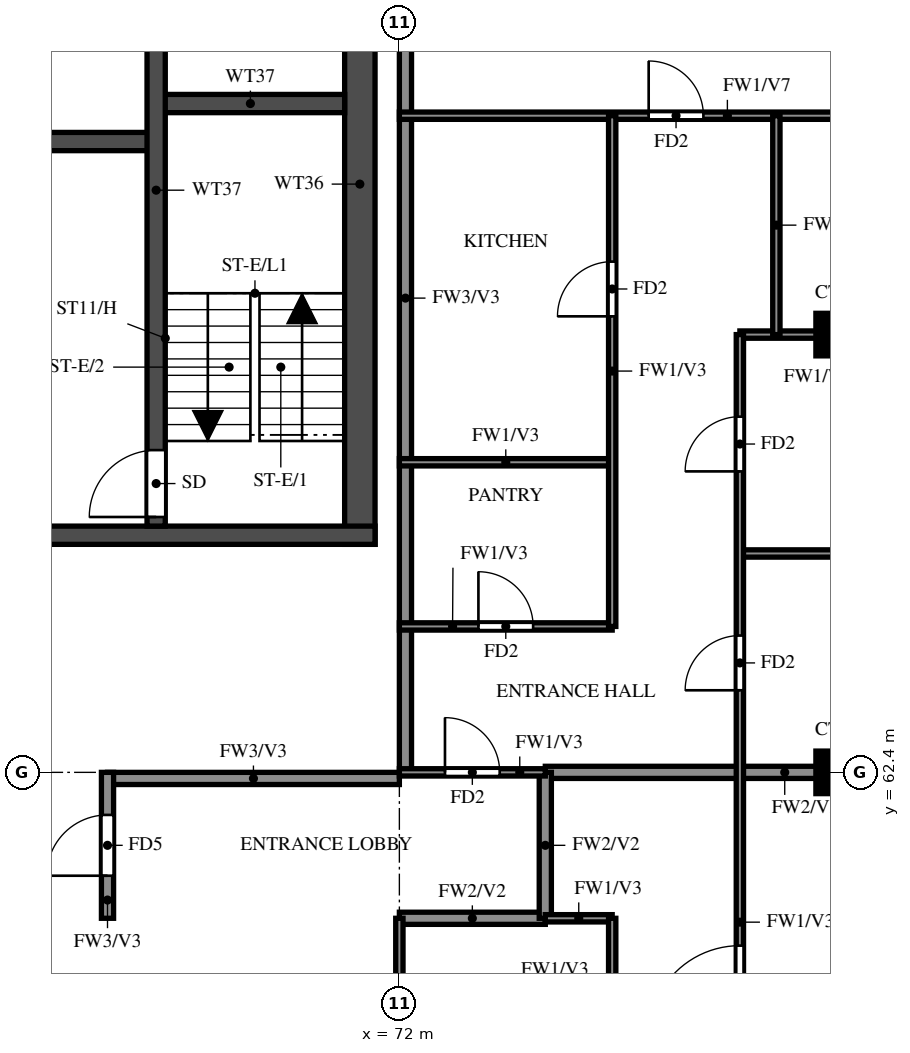
"""IFC4 building model, lengths in metres.
Left out: names, types, materials, properties, quantities, classifications, styles, units other than length and angle.
Written with IfcOpenShell. Run it as: python <this file> out.ifc"""

import sys

from ifc_helpers import new_model, si_unit, direction, frame, frame_2d, origin, origin_2d, place, context, subcontext, project, spatial, rectangle, extrude, source, transform, mapped, element, fill, save


model = new_model("IFC4")
c1 = context("Model", 3, precision=1e-05, world=origin(), true_north=direction((0.0, 1.0)))
c2 = subcontext(c1, "Body", "Model", "MODEL_VIEW")
j1 = project(units=[si_unit("LENGTHUNIT", "METRE"), si_unit("PLANEANGLEUNIT", "RADIAN")], contexts=[c1])
p1 = place(None, origin())
s1 = spatial("IfcSite", under=j1, at=p1, CompositionType="ELEMENT")
p2 = place(p1, origin())
s2 = spatial("IfcBuilding", under=s1, at=p2, CompositionType="ELEMENT")
p3 = place(p2, frame((0.0, 0.0, 257.0)))
s3 = spatial("IfcBuildingStorey", under=s2, at=p3, CompositionType="ELEMENT", Elevation=257.0)
m1 = source(origin(), c2, "Body", "SweptSolid", [
    extrude(rectangle(XDim=0.7, YDim=0.7, at=origin_2d()), origin(), (0.0, 0.0, 1.0), 3.22),
])
for number, where, z_axis, x_axis in (
    (1, (79.2, 62.4, 0.0), (0.0, 0.0, 1.0), (1.0, 0.0, 0.0)),
    (2, (79.2, 69.6, 0.0), (0.0, 0.0, 1.0), (1.0, 0.0, 0.0)),
):
    element("IfcColumn", number, at=place(p3, frame(where, z_axis=z_axis, x_axis=x_axis)), inside=s3, PredefinedType="COLUMN", context=c2, shape_type="MappedRepresentation", body=[
        mapped(m1, transform((0.0, 0.0, 0.0))),
    ])
p4 = place(p3, frame((71.35, 66.15, 0.0), z_axis=(0.0, 0.0, 1.0), x_axis=(0.0, 1.0, 0.0)))
e3 = element("IfcWall", 3, at=p4, inside=s3, PredefinedType="SHEAR", context=c2, shape_type="SweptSolid", body=[
    extrude(rectangle(XDim=11.85, YDim=0.5, at=frame_2d((5.925, 0.0))), origin(), (0.0, 0.0, 1.0), 3.22),
])
p5 = place(p3, frame((29.2, 66.3, 0.0), z_axis=(0.0, 0.0, 1.0), x_axis=(1.0, 0.0, 0.0)))
e4 = element("IfcWall", 4, at=p5, inside=s3, PredefinedType="SHEAR", context=c2, shape_type="SweptSolid", body=[
    extrude(rectangle(XDim=42.4, YDim=0.3, at=frame_2d((21.2, 0.0))), origin(), (0.0, 0.0, 1.0), 3.22),
])
p6 = place(p5, frame((1.425, 0.0, 0.0)))
e5 = element("IfcOpeningElement", 5, at=p6, cuts=e4, PredefinedType="OPENING", context=c2, shape_type="SweptSolid", body=[
    extrude(rectangle(XDim=1.1, YDim=2.1, at=frame_2d((0.55, 1.05))), frame((0.0, 0.16, 0.0), z_axis=(0.0, -1.0, 0.0), x_axis=(1.0, 0.0, 0.0)), (0.0, 0.0, 1.0), 0.32),
])
p7 = place(p5, frame((4.2, 0.0, 0.0)))
e6 = element("IfcOpeningElement", 6, at=p7, cuts=e4, PredefinedType="OPENING", context=c2, shape_type="SweptSolid", body=[
    extrude(rectangle(XDim=1.8, YDim=2.1, at=frame_2d((0.9, 1.05))), frame((0.0, 0.16, 0.0), z_axis=(0.0, -1.0, 0.0), x_axis=(1.0, 0.0, 0.0)), (0.0, 0.0, 1.0), 0.32),
])
p8 = place(p3, frame((32.8, 72.775, 0.0), z_axis=(0.0, 0.0, 1.0), x_axis=(1.0, 0.0, 0.0)))
e7 = element("IfcWall", 7, at=p8, inside=s3, PredefinedType="SHEAR", context=c2, shape_type="SweptSolid", body=[
    extrude(rectangle(XDim=35.2, YDim=0.3, at=frame_2d((17.6, 0.0))), origin(), (0.0, 0.0, 1.0), 3.22),
])
p9 = place(p8, frame((19.8, 0.0, 0.0)))
e8 = element("IfcOpeningElement", 8, at=p9, cuts=e7, PredefinedType="OPENING", context=c2, shape_type="SweptSolid", body=[
    extrude(rectangle(XDim=1.1, YDim=2.1, at=frame_2d((0.55, 1.05))), frame((0.0, 0.16, 0.0), z_axis=(0.0, -1.0, 0.0), x_axis=(1.0, 0.0, 0.0)), (0.0, 0.0, 1.0), 0.32),
])
p10 = place(p8, frame((27.725, 0.0, 0.0)))
e9 = element("IfcOpeningElement", 9, at=p10, cuts=e7, PredefinedType="OPENING", context=c2, shape_type="SweptSolid", body=[
    extrude(rectangle(XDim=1.1, YDim=2.1, at=frame_2d((0.55, 1.05))), frame((0.0, 0.16, 0.0), z_axis=(0.0, -1.0, 0.0), x_axis=(1.0, 0.0, 0.0)), (0.0, 0.0, 1.0), 0.32),
])
p11 = place(p8, frame((30.325, 0.0, 0.0)))
e10 = element("IfcOpeningElement", 10, at=p11, cuts=e7, PredefinedType="OPENING", context=c2, shape_type="SweptSolid", body=[
    extrude(rectangle(XDim=1.1, YDim=2.1, at=frame_2d((0.55, 1.05))), frame((0.0, 0.16, 0.0), z_axis=(0.0, -1.0, 0.0), x_axis=(1.0, 0.0, 0.0)), (0.0, 0.0, 1.0), 0.32),
])
p12 = place(p8, frame((3.825, 0.0, 0.0)))
e11 = element("IfcOpeningElement", 11, at=p12, cuts=e7, PredefinedType="OPENING", context=c2, shape_type="SweptSolid", body=[
    extrude(rectangle(XDim=1.1, YDim=2.1, at=frame_2d((0.55, 1.05))), frame((0.0, 0.16, 0.0), z_axis=(0.0, -1.0, 0.0), x_axis=(1.0, 0.0, 0.0)), (0.0, 0.0, 1.0), 0.32),
])
p13 = place(p8, frame((6.575, 0.0, 0.0)))
e12 = element("IfcOpeningElement", 12, at=p13, cuts=e7, PredefinedType="OPENING", context=c2, shape_type="SweptSolid", body=[
    extrude(rectangle(XDim=1.1, YDim=2.1, at=frame_2d((0.55, 1.05))), frame((0.0, 0.16, 0.0), z_axis=(0.0, -1.0, 0.0), x_axis=(1.0, 0.0, 0.0)), (0.0, 0.0, 1.0), 0.32),
])
p14 = place(p8, frame((9.325, 0.0, 0.0)))
e13 = element("IfcOpeningElement", 13, at=p14, cuts=e7, PredefinedType="OPENING", context=c2, shape_type="SweptSolid", body=[
    extrude(rectangle(XDim=1.1, YDim=2.1, at=frame_2d((0.55, 1.05))), frame((0.0, 0.16, 0.0), z_axis=(0.0, -1.0, 0.0), x_axis=(1.0, 0.0, 0.0)), (0.0, 0.0, 1.0), 0.32),
])
p15 = place(p8, frame((12.075, 0.0, 0.0)))
e14 = element("IfcOpeningElement", 14, at=p15, cuts=e7, PredefinedType="OPENING", context=c2, shape_type="SweptSolid", body=[
    extrude(rectangle(XDim=1.1, YDim=2.1, at=frame_2d((0.55, 1.05))), frame((0.0, 0.16, 0.0), z_axis=(0.0, -1.0, 0.0), x_axis=(1.0, 0.0, 0.0)), (0.0, 0.0, 1.0), 0.32),
])
p16 = place(p8, frame((14.825, 0.0, 0.0)))
e15 = element("IfcOpeningElement", 15, at=p16, cuts=e7, PredefinedType="OPENING", context=c2, shape_type="SweptSolid", body=[
    extrude(rectangle(XDim=1.1, YDim=2.1, at=frame_2d((0.55, 1.05))), frame((0.0, 0.16, 0.0), z_axis=(0.0, -1.0, 0.0), x_axis=(1.0, 0.0, 0.0)), (0.0, 0.0, 1.0), 0.32),
])
p17 = place(p8, frame((17.575, 0.0, 0.0)))
e16 = element("IfcOpeningElement", 16, at=p17, cuts=e7, PredefinedType="OPENING", context=c2, shape_type="SweptSolid", body=[
    extrude(rectangle(XDim=1.1, YDim=2.1, at=frame_2d((0.55, 1.05))), frame((0.0, 0.16, 0.0), z_axis=(0.0, -1.0, 0.0), x_axis=(1.0, 0.0, 0.0)), (0.0, 0.0, 1.0), 0.32),
])
p18 = place(p8, frame((0.95, 0.0, 0.0)))
e17 = element("IfcOpeningElement", 17, at=p18, cuts=e7, PredefinedType="OPENING", context=c2, shape_type="SweptSolid", body=[
    extrude(rectangle(XDim=1.1, YDim=2.1, at=frame_2d((0.55, 1.05))), frame((0.0, 0.16, 0.0), z_axis=(0.0, -1.0, 0.0), x_axis=(1.0, 0.0, 0.0)), (0.0, 0.0, 1.0), 0.32),
])
p19 = place(p3, frame((68.0, 73.4, 0.0), z_axis=(0.0, 0.0, 1.0), x_axis=(1.0, 0.0, 0.0)))
e18 = element("IfcWall", 18, at=p19, inside=s3, PredefinedType="SHEAR", context=c2, shape_type="SweptSolid", body=[
    extrude(rectangle(XDim=3.1, YDim=0.3, at=frame_2d((1.55, 0.0))), origin(), (0.0, 0.0, 1.0), 3.22),
])
p20 = place(p3, frame((68.0, 66.45, 0.0), z_axis=(0.0, 0.0, 1.0), x_axis=(0.0, 1.0, 0.0)))
e19 = element("IfcWall", 19, at=p20, inside=s3, PredefinedType="SHEAR", context=c2, shape_type="SweptSolid", body=[
    extrude(rectangle(XDim=11.05, YDim=0.3, at=frame_2d((5.525, 0.0))), origin(), (0.0, 0.0, 1.0), 3.22),
])
p21 = place(p20, frame((0.15, 0.0, 0.0)))
e20 = element("IfcOpeningElement", 20, at=p21, cuts=e19, PredefinedType="OPENING", context=c2, shape_type="SweptSolid", body=[
    extrude(rectangle(XDim=1.1, YDim=2.1, at=frame_2d((0.55, 1.05))), frame((0.0, 0.16, 0.0), z_axis=(0.0, -1.0, 0.0), x_axis=(1.0, 0.0, 0.0)), (0.0, 0.0, 1.0), 0.32),
])
p22 = place(p3, frame((67.2, 62.3, 0.0), z_axis=(0.0, 0.0, 1.0), x_axis=(1.0, 0.0, 0.0)))
e21 = element("IfcWall", 21, at=p22, inside=s3, PredefinedType="SOLIDWALL", context=c2, shape_type="SweptSolid", body=[
    extrude(rectangle(XDim=4.8, YDim=0.2, at=frame_2d((2.4, 0.0))), origin(), (0.0, 0.0, 1.0), 3.22),
])
p23 = place(p3, frame((67.2, 60.0, 0.0), z_axis=(0.0, 0.0, 1.0), x_axis=(0.0, 1.0, 0.0)))
e22 = element("IfcWall", 22, at=p23, inside=s3, PredefinedType="SOLIDWALL", context=c2, shape_type="SweptSolid", body=[
    extrude(rectangle(XDim=2.4, YDim=0.2, at=frame_2d((1.2, 0.0))), origin(), (0.0, 0.0, 1.0), 3.22),
])
p24 = place(p23, frame((0.7, 0.0, 0.0)))
e23 = element("IfcOpeningElement", 23, at=p24, cuts=e22, PredefinedType="OPENING", context=c2, shape_type="SweptSolid", body=[
    extrude(rectangle(XDim=1.0, YDim=2.1, at=frame_2d((0.5, 1.05))), frame((0.0, 0.11, 0.0), z_axis=(0.0, -1.0, 0.0), x_axis=(1.0, 0.0, 0.0)), (0.0, 0.0, 1.0), 0.22),
])
p25 = place(p3, frame((72.1, 62.4, 0.0), z_axis=(0.0, 0.0, 1.0), x_axis=(0.0, 1.0, 0.0)))
e24 = element("IfcWall", 24, at=p25, inside=s3, PredefinedType="SOLIDWALL", context=c2, shape_type="SweptSolid", body=[
    extrude(rectangle(XDim=15.6, YDim=0.2, at=frame_2d((7.8, 0.0))), origin(), (0.0, 0.0, 1.0), 3.22),
])
p26 = place(p3, frame((72.0, 60.0, 0.0), z_axis=(0.0, 0.0, 1.0), x_axis=(1.0, 0.0, 0.0)))
e25 = element("IfcWall", 25, at=p26, inside=s3, PredefinedType="SOLIDWALL", context=c2, shape_type="SweptSolid", body=[
    extrude(rectangle(XDim=2.4, YDim=0.2, at=frame_2d((1.2, 0.0))), origin(), (0.0, 0.0, 1.0), 3.22),
])
p27 = place(p3, frame((74.4, 62.4, 0.0), z_axis=(0.0, 0.0, 1.0), x_axis=(1.0, 0.0, 0.0)))
e26 = element("IfcWall", 26, at=p27, inside=s3, PredefinedType="SOLIDWALL", context=c2, shape_type="SweptSolid", body=[
    extrude(rectangle(XDim=7.875, YDim=0.2, at=frame_2d((3.938, 0.0))), origin(), (0.0, 0.0, 1.0), 3.22),
])
p28 = place(p3, frame((74.4, 60.0, 0.0), z_axis=(0.0, 0.0, 1.0), x_axis=(0.0, 1.0, 0.0)))
e27 = element("IfcWall", 27, at=p28, inside=s3, PredefinedType="SOLIDWALL", context=c2, shape_type="SweptSolid", body=[
    extrude(rectangle(XDim=2.4, YDim=0.2, at=frame_2d((1.2, 0.0))), origin(), (0.0, 0.0, 1.0), 3.22),
])
p29 = place(p3, frame((74.4, 60.0, 0.0), z_axis=(0.0, 0.0, 1.0), x_axis=(1.0, 0.0, 0.0)))
e28 = element("IfcWall", 28, at=p29, inside=s3, PredefinedType="PARTITIONING", context=c2, shape_type="SweptSolid", body=[
    extrude(rectangle(XDim=1.1, YDim=0.12, at=frame_2d((0.55, 0.0))), origin(), (0.0, 0.0, 1.0), 3.22),
])
p30 = place(p3, frame((72.0, 62.4, 0.0), z_axis=(0.0, 0.0, 1.0), x_axis=(1.0, 0.0, 0.0)))
e29 = element("IfcWall", 29, at=p30, inside=s3, PredefinedType="PARTITIONING", context=c2, shape_type="SweptSolid", body=[
    extrude(rectangle(XDim=2.4, YDim=0.12, at=frame_2d((1.2, 0.0))), origin(), (0.0, 0.0, 1.0), 3.22),
])
p31 = place(p30, frame((0.75, 0.0, 0.0)))
e30 = element("IfcOpeningElement", 30, at=p31, cuts=e29, PredefinedType="OPENING", context=c2, shape_type="SweptSolid", body=[
    extrude(rectangle(XDim=0.9, YDim=2.1, at=frame_2d((0.45, 1.05))), frame((0.0, 0.07, 0.0), z_axis=(0.0, -1.0, 0.0), x_axis=(1.0, 0.0, 0.0)), (0.0, 0.0, 1.0), 0.14),
])
p32 = place(p3, frame((72.0, 64.8, 0.0), z_axis=(0.0, 0.0, 1.0), x_axis=(1.0, 0.0, 0.0)))
e31 = element("IfcWall", 31, at=p32, inside=s3, PredefinedType="PARTITIONING", context=c2, shape_type="SweptSolid", body=[
    extrude(rectangle(XDim=3.5, YDim=0.12, at=frame_2d((1.75, 0.0))), origin(), (0.0, 0.0, 1.0), 3.22),
])
p33 = place(p32, frame((1.3, 0.0, 0.0)))
e32 = element("IfcOpeningElement", 32, at=p33, cuts=e31, PredefinedType="OPENING", context=c2, shape_type="SweptSolid", body=[
    extrude(rectangle(XDim=0.9, YDim=2.1, at=frame_2d((0.45, 1.05))), frame((0.0, 0.07, 0.0), z_axis=(0.0, -1.0, 0.0), x_axis=(1.0, 0.0, 0.0)), (0.0, 0.0, 1.0), 0.14),
])
p34 = place(p3, frame((77.6, 66.0, 0.0), z_axis=(0.0, 0.0, 1.0), x_axis=(1.0, 0.0, 0.0)))
e33 = element("IfcWall", 33, at=p34, inside=s3, PredefinedType="PARTITIONING", context=c2, shape_type="SweptSolid", body=[
    extrude(rectangle(XDim=4.675, YDim=0.12, at=frame_2d((2.337, 0.0))), origin(), (0.0, 0.0, 1.0), 2.32),
])
p35 = place(p3, frame((72.0, 67.5, 0.0), z_axis=(0.0, 0.0, 1.0), x_axis=(1.0, 0.0, 0.0)))
e34 = element("IfcWall", 34, at=p35, inside=s3, PredefinedType="PARTITIONING", context=c2, shape_type="SweptSolid", body=[
    extrude(rectangle(XDim=3.5, YDim=0.12, at=frame_2d((1.75, 0.0))), origin(), (0.0, 0.0, 1.0), 3.22),
])
p36 = place(p3, frame((77.6, 69.6, 0.0), z_axis=(0.0, 0.0, 1.0), x_axis=(1.0, 0.0, 0.0)))
e35 = element("IfcWall", 35, at=p36, inside=s3, PredefinedType="PARTITIONING", context=c2, shape_type="SweptSolid", body=[
    extrude(rectangle(XDim=4.675, YDim=0.12, at=frame_2d((2.337, 0.0))), origin(), (0.0, 0.0, 1.0), 3.22),
])
p37 = place(p36, frame((2.337, 0.0, 0.0)))
e36 = element("IfcOpeningElement", 36, at=p37, cuts=e35, PredefinedType="OPENING", context=c2, shape_type="SweptSolid", body=[
    extrude(rectangle(XDim=0.8, YDim=2.1, at=frame_2d((0.4, 1.05))), frame((0.0, 0.07, 0.0), z_axis=(0.0, -1.0, 0.0), x_axis=(1.0, 0.0, 0.0)), (0.0, 0.0, 1.0), 0.14),
])
p38 = place(p3, frame((72.0, 73.2, 0.0), z_axis=(0.0, 0.0, 1.0), x_axis=(1.0, 0.0, 0.0)))
e37 = element("IfcWall", 37, at=p38, inside=s3, PredefinedType="PARTITIONING", context=c2, shape_type="SweptSolid", body=[
    extrude(rectangle(XDim=10.275, YDim=0.12, at=frame_2d((5.137, 0.0))), origin(), (0.0, 0.0, 1.0), 2.32),
])
p39 = place(p38, frame((4.1, 0.0, 0.0)))
e38 = element("IfcOpeningElement", 38, at=p39, cuts=e37, PredefinedType="OPENING", context=c2, shape_type="SweptSolid", body=[
    extrude(rectangle(XDim=0.9, YDim=2.1, at=frame_2d((0.45, 1.05))), frame((0.0, 0.07, 0.0), z_axis=(0.0, -1.0, 0.0), x_axis=(1.0, 0.0, 0.0)), (0.0, 0.0, 1.0), 0.14),
])
for number, where, z_axis, x_axis in (
    (39, (72.0, 57.6, 0.0), (0.0, 0.0, 1.0), (0.0, 1.0, 0.0)),
    (40, (75.5, 57.6, 0.0), (0.0, 0.0, 1.0), (0.0, 1.0, 0.0)),
):
    element("IfcWall", number, at=place(p3, frame(where, z_axis=z_axis, x_axis=x_axis)), inside=s3, PredefinedType="PARTITIONING", context=c2, shape_type="SweptSolid", body=[
        extrude(rectangle(XDim=2.4, YDim=0.12, at=frame_2d((1.2, 0.0))), origin(), (0.0, 0.0, 1.0), 3.22),
    ])
p40 = place(p3, frame((75.5, 64.8, 0.0), z_axis=(0.0, 0.0, 1.0), x_axis=(0.0, 1.0, 0.0)))
e41 = element("IfcWall", 41, at=p40, inside=s3, PredefinedType="PARTITIONING", context=c2, shape_type="SweptSolid", body=[
    extrude(rectangle(XDim=8.4, YDim=0.12, at=frame_2d((4.2, 0.0))), origin(), (0.0, 0.0, 1.0), 3.22),
])
p41 = place(p40, frame((5.1, 0.0, 0.0)))
e42 = element("IfcOpeningElement", 42, at=p41, cuts=e41, PredefinedType="OPENING", context=c2, shape_type="SweptSolid", body=[
    extrude(rectangle(XDim=0.9, YDim=2.1, at=frame_2d((0.45, 1.05))), frame((0.0, 0.07, 0.0), z_axis=(0.0, -1.0, 0.0), x_axis=(1.0, 0.0, 0.0)), (0.0, 0.0, 1.0), 0.14),
])
p42 = place(p3, frame((77.6, 48.125, 0.0), z_axis=(0.0, 0.0, 1.0), x_axis=(0.0, 1.0, 0.0)))
e43 = element("IfcWall", 43, at=p42, inside=s3, PredefinedType="PARTITIONING", context=c2, shape_type="SweptSolid", body=[
    extrude(rectangle(XDim=21.475, YDim=0.12, at=frame_2d((10.738, 0.0))), origin(), (0.0, 0.0, 1.0), 3.22),
])
p43 = place(p42, frame((1.288, 0.0, 0.0)))
e44 = element("IfcOpeningElement", 44, at=p43, cuts=e43, PredefinedType="OPENING", context=c2, shape_type="SweptSolid", body=[
    extrude(rectangle(XDim=0.9, YDim=2.1, at=frame_2d((0.45, 1.05))), frame((0.0, 0.07, 0.0), z_axis=(0.0, -1.0, 0.0), x_axis=(1.0, 0.0, 0.0)), (0.0, 0.0, 1.0), 0.14),
])
p44 = place(p42, frame((4.825, 0.0, 0.0)))
e45 = element("IfcOpeningElement", 45, at=p44, cuts=e43, PredefinedType="OPENING", context=c2, shape_type="SweptSolid", body=[
    extrude(rectangle(XDim=0.9, YDim=2.1, at=frame_2d((0.45, 1.05))), frame((0.0, 0.07, 0.0), z_axis=(0.0, -1.0, 0.0), x_axis=(1.0, 0.0, 0.0)), (0.0, 0.0, 1.0), 0.14),
])
p45 = place(p42, frame((9.925, 0.0, 0.0)))
e46 = element("IfcOpeningElement", 46, at=p45, cuts=e43, PredefinedType="OPENING", context=c2, shape_type="SweptSolid", body=[
    extrude(rectangle(XDim=1.5, YDim=2.1, at=frame_2d((0.75, 1.05))), frame((0.0, 0.07, 0.0), z_axis=(0.0, -1.0, 0.0), x_axis=(1.0, 0.0, 0.0)), (0.0, 0.0, 1.0), 0.14),
])
p46 = place(p42, frame((15.625, 0.0, 0.0)))
e47 = element("IfcOpeningElement", 47, at=p46, cuts=e43, PredefinedType="OPENING", context=c2, shape_type="SweptSolid", body=[
    extrude(rectangle(XDim=0.9, YDim=2.1, at=frame_2d((0.45, 1.05))), frame((0.0, 0.07, 0.0), z_axis=(0.0, -1.0, 0.0), x_axis=(1.0, 0.0, 0.0)), (0.0, 0.0, 1.0), 0.14),
])
p47 = place(p42, frame((19.225, 0.0, 0.0)))
e48 = element("IfcOpeningElement", 48, at=p47, cuts=e43, PredefinedType="OPENING", context=c2, shape_type="SweptSolid", body=[
    extrude(rectangle(XDim=0.9, YDim=2.1, at=frame_2d((0.45, 1.05))), frame((0.0, 0.07, 0.0), z_axis=(0.0, -1.0, 0.0), x_axis=(1.0, 0.0, 0.0)), (0.0, 0.0, 1.0), 0.14),
])
p48 = place(p3, frame((78.2, 69.6, 0.0), z_axis=(0.0, 0.0, 1.0), x_axis=(0.0, 1.0, 0.0)))
e49 = element("IfcWall", 49, at=p48, inside=s3, PredefinedType="PARTITIONING", context=c2, shape_type="SweptSolid", body=[
    extrude(rectangle(XDim=3.6, YDim=0.12, at=frame_2d((1.8, 0.0))), origin(), (0.0, 0.0, 1.0), 3.22),
])
p49 = place(p21, origin())
e50 = element("IfcDoor", 50, at=p49, inside=s3, OperationType="SINGLE_SWING_RIGHT", PredefinedType="DOOR", context=c2, shape_type="SweptSolid", body=[
    extrude(rectangle(XDim=1.1, YDim=2.1, at=frame_2d((0.55, 1.05))), frame((0.0, 0.025, 0.0), z_axis=(0.0, -1.0, 0.0), x_axis=(1.0, 0.0, 0.0)), (0.0, 0.0, 1.0), 0.05),
])
fill(e20, e50)
p50 = place(p45, origin())
e51 = element("IfcDoor", 51, at=p50, inside=s3, OperationType="SINGLE_SWING_RIGHT", PredefinedType="DOOR", context=c2, shape_type="SweptSolid", body=[
    extrude(rectangle(XDim=1.5, YDim=2.1, at=frame_2d((0.75, 1.05))), frame((0.0, 0.025, 0.0), z_axis=(0.0, -1.0, 0.0), x_axis=(1.0, 0.0, 0.0)), (0.0, 0.0, 1.0), 0.05),
])
fill(e46, e51)
p51 = place(p31, origin())
e52 = element("IfcDoor", 52, at=p51, inside=s3, OperationType="SINGLE_SWING_LEFT", PredefinedType="DOOR", context=c2, shape_type="SweptSolid", body=[
    extrude(rectangle(XDim=0.9, YDim=2.1, at=frame_2d((0.45, 1.05))), frame((0.0, 0.025, 0.0), z_axis=(0.0, -1.0, 0.0), x_axis=(1.0, 0.0, 0.0)), (0.0, 0.0, 1.0), 0.05),
])
fill(e30, e52)
p52 = place(p24, origin())
e53 = element("IfcDoor", 53, at=p52, inside=s3, OperationType="SINGLE_SWING_LEFT", PredefinedType="DOOR", context=c2, shape_type="SweptSolid", body=[
    extrude(rectangle(XDim=1.0, YDim=2.1, at=frame_2d((0.5, 1.05))), frame((0.0, 0.025, 0.0), z_axis=(0.0, -1.0, 0.0), x_axis=(1.0, 0.0, 0.0)), (0.0, 0.0, 1.0), 0.05),
])
fill(e23, e53)
p53 = place(p46, origin())
e54 = element("IfcDoor", 54, at=p53, inside=s3, OperationType="SINGLE_SWING_RIGHT", PredefinedType="DOOR", context=c2, shape_type="SweptSolid", body=[
    extrude(rectangle(XDim=0.9, YDim=2.1, at=frame_2d((0.45, 1.05))), frame((0.0, 0.025, 0.0), z_axis=(0.0, -1.0, 0.0), x_axis=(1.0, 0.0, 0.0)), (0.0, 0.0, 1.0), 0.05),
])
fill(e47, e54)
p54 = place(p47, origin())
e55 = element("IfcDoor", 55, at=p54, inside=s3, OperationType="SINGLE_SWING_LEFT", PredefinedType="DOOR", context=c2, shape_type="SweptSolid", body=[
    extrude(rectangle(XDim=0.9, YDim=2.1, at=frame_2d((0.45, 1.05))), frame((0.0, 0.025, 0.0), z_axis=(0.0, -1.0, 0.0), x_axis=(1.0, 0.0, 0.0)), (0.0, 0.0, 1.0), 0.05),
])
fill(e48, e55)
p55 = place(p39, origin())
e56 = element("IfcDoor", 56, at=p55, inside=s3, OperationType="SINGLE_SWING_RIGHT", PredefinedType="DOOR", context=c2, shape_type="SweptSolid", body=[
    extrude(rectangle(XDim=0.9, YDim=2.1, at=frame_2d((0.45, 1.05))), frame((0.0, 0.025, 0.0), z_axis=(0.0, -1.0, 0.0), x_axis=(1.0, 0.0, 0.0)), (0.0, 0.0, 1.0), 0.05),
])
fill(e38, e56)
p56 = place(p33, origin())
e57 = element("IfcDoor", 57, at=p56, inside=s3, OperationType="SINGLE_SWING_LEFT", PredefinedType="DOOR", context=c2, shape_type="SweptSolid", body=[
    extrude(rectangle(XDim=0.9, YDim=2.1, at=frame_2d((0.45, 1.05))), frame((0.0, 0.025, 0.0), z_axis=(0.0, -1.0, 0.0), x_axis=(1.0, 0.0, 0.0)), (0.0, 0.0, 1.0), 0.05),
])
fill(e32, e57)
p57 = place(p41, origin())
e58 = element("IfcDoor", 58, at=p57, inside=s3, OperationType="SINGLE_SWING_LEFT", PredefinedType="DOOR", context=c2, shape_type="SweptSolid", body=[
    extrude(rectangle(XDim=0.9, YDim=2.1, at=frame_2d((0.45, 1.05))), frame((0.0, 0.025, 0.0), z_axis=(0.0, -1.0, 0.0), x_axis=(1.0, 0.0, 0.0)), (0.0, 0.0, 1.0), 0.05),
])
fill(e42, e58)
save(model, sys.argv[1])
